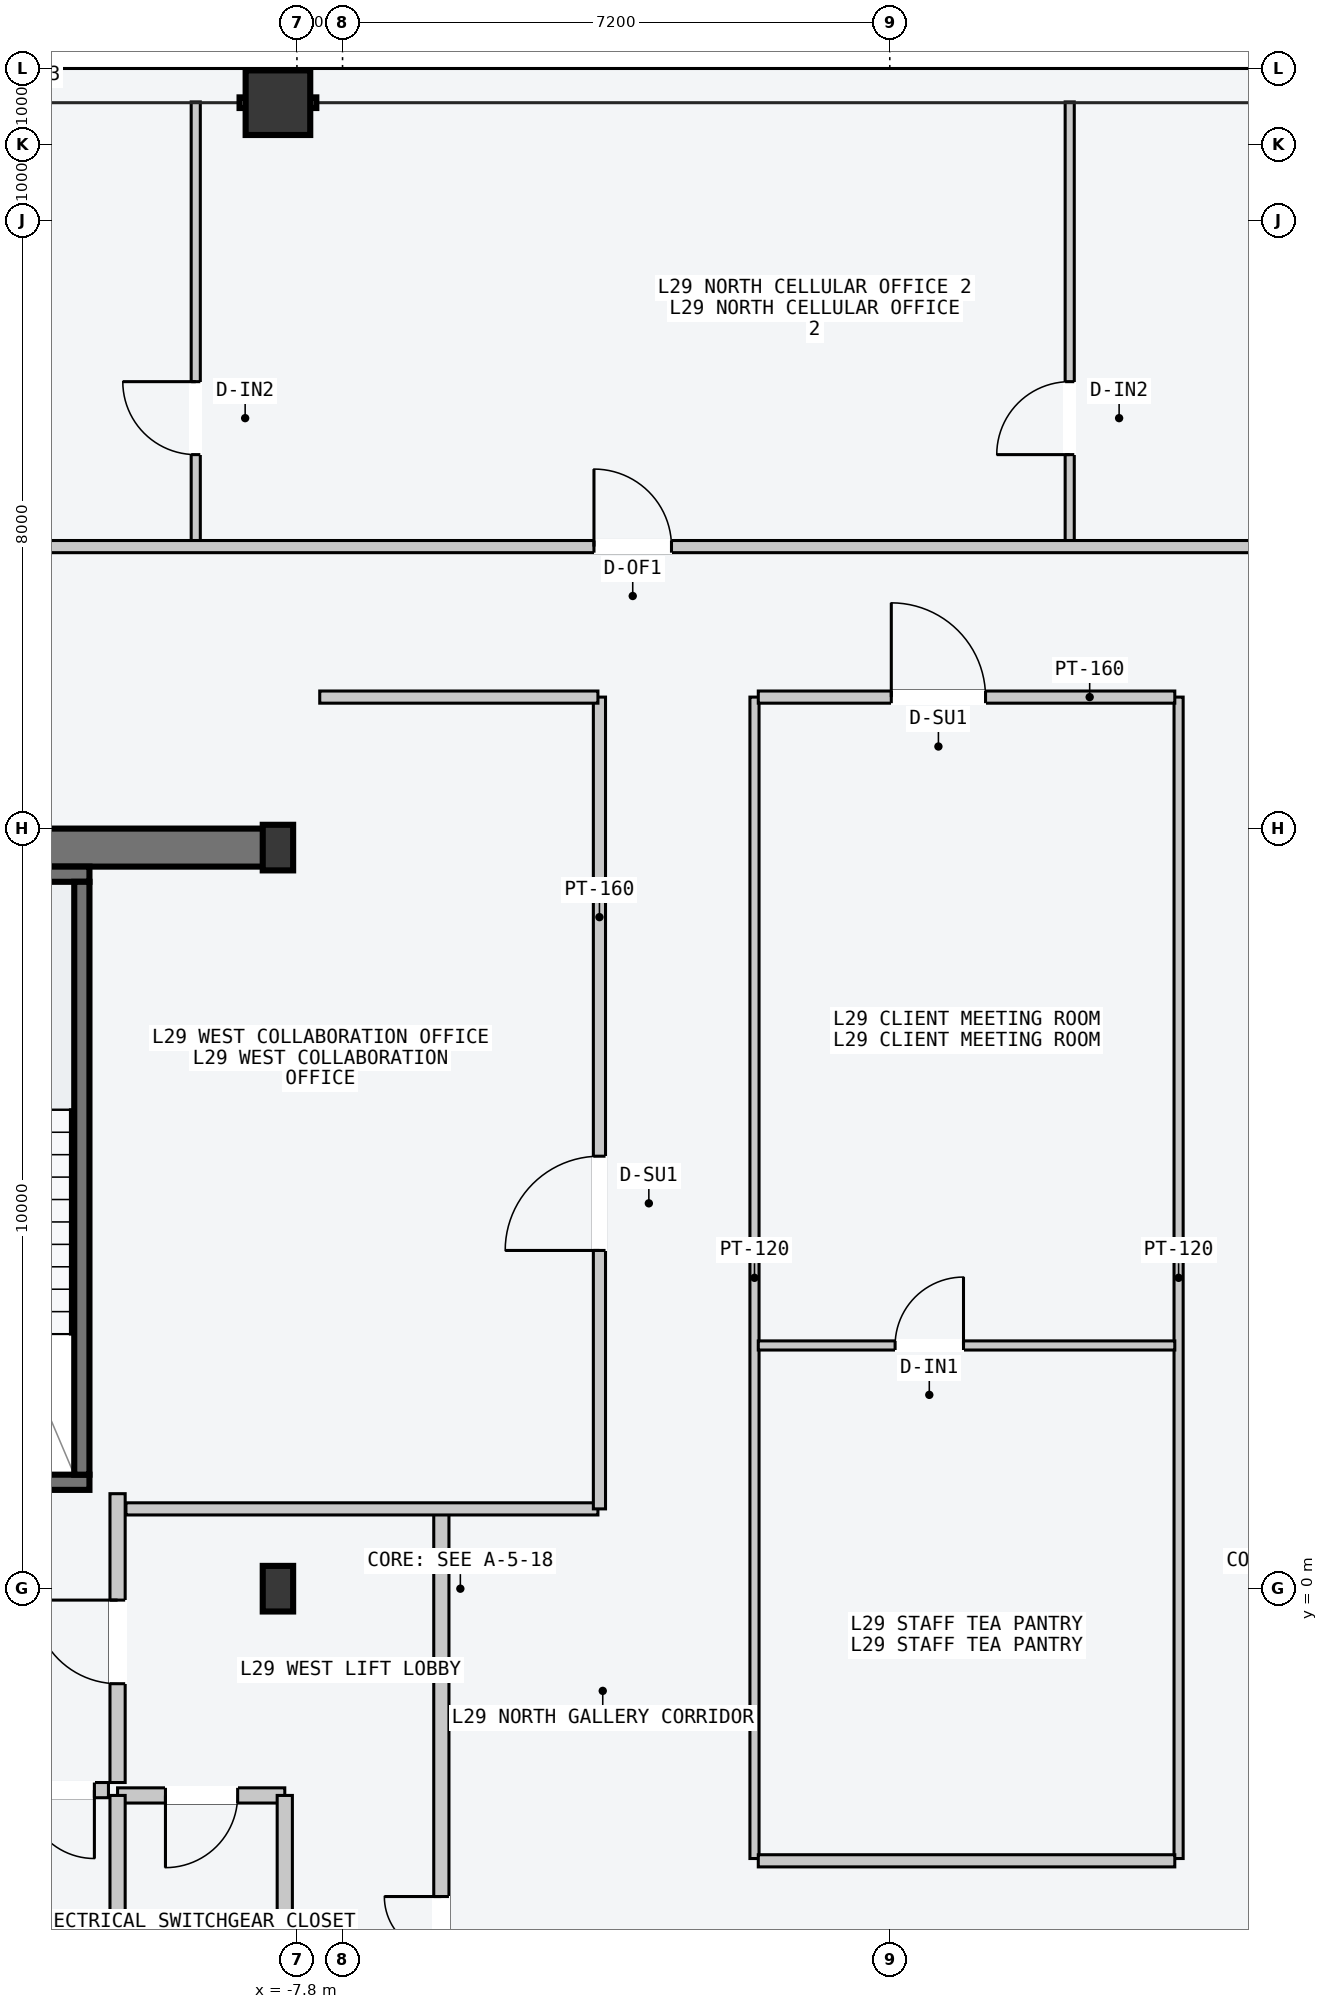
"""IFC4 building model, lengths in metres.
Left out: names, types, materials, properties, quantities, classifications, styles, units other than length and angle.
Written with IfcOpenShell. Run it as: python <this file> out.ifc"""

import sys

from ifc_helpers import new_model, si_unit, direction, frame, frame_2d, origin, origin_2d, place, context, subcontext, project, spatial, rectangle, hollow_rectangle, i_section, extrude, element, fill, save


model = new_model("IFC4")
c1 = context("Model", 3, precision=1e-05, world=origin(), true_north=direction((0.0, 1.0)))
c2 = subcontext(c1, "Body", "Model", "MODEL_VIEW")
j1 = project(units=[si_unit("LENGTHUNIT", "METRE"), si_unit("PLANEANGLEUNIT", "RADIAN")], contexts=[c1])
p1 = place(None, origin())
s1 = spatial("IfcSite", under=j1, at=p1, CompositionType="ELEMENT")
p2 = place(p1, origin())
s2 = spatial("IfcBuilding", under=s1, at=p2, CompositionType="ELEMENT")
p3 = place(p2, frame((0.0, 0.0, 113.4)))
s3 = spatial("IfcBuildingStorey", under=s2, at=p3, CompositionType="ELEMENT", Elevation=113.4)
p4 = place(p3, frame((-14.53, 9.75, -0.2), z_axis=(0.0, 0.0, 1.0), x_axis=(1.0, 0.0, 0.0)))
e1 = element("IfcWall", 1, at=p4, inside=s3, PredefinedType="SHEAR", context=c2, shape_type="SweptSolid", body=[
    extrude(rectangle(XDim=6.46, YDim=0.5, at=frame_2d((3.23, 0.0))), origin(), (0.0, 0.0, 1.0), 3.6),
])
p5 = place(p3, frame((-14.25, 1.4, -0.2), z_axis=(0.0, 0.0, 1.0), x_axis=(1.0, 0.0, 0.0)))
e2 = element("IfcWall", 2, at=p5, inside=s3, PredefinedType="SOLIDWALL", context=c2, shape_type="SweptSolid", body=[
    extrude(rectangle(XDim=3.72, YDim=0.2, at=frame_2d((1.86, 0.0))), origin(), (0.0, 0.0, 1.0), 3.6),
])
p6 = place(p5, frame((1.5, 0.0, 0.2)))
e3 = element("IfcOpeningElement", 3, at=p6, cuts=e2, PredefinedType="OPENING", context=c2, shape_type="SweptSolid", body=[
    extrude(rectangle(XDim=1.12, YDim=2.18, at=frame_2d((0.56, 1.09))), frame((0.0, 0.11, 0.0), z_axis=(0.0, -1.0, 0.0), x_axis=(1.0, 0.0, 0.0)), (0.0, 0.0, 1.0), 0.22),
])
p7 = place(p3, frame((-14.25, 9.4, -0.2), z_axis=(0.0, 0.0, 1.0), x_axis=(1.0, 0.0, 0.0)))
e4 = element("IfcWall", 4, at=p7, inside=s3, PredefinedType="SOLIDWALL", context=c2, shape_type="SweptSolid", body=[
    extrude(rectangle(XDim=3.72, YDim=0.2, at=frame_2d((1.86, 0.0))), origin(), (0.0, 0.0, 1.0), 3.6),
])
p8 = place(p3, frame((-10.63, 1.5, -0.2), z_axis=(0.0, 0.0, 1.0), x_axis=(0.0, 1.0, 0.0)))
e5 = element("IfcWall", 5, at=p8, inside=s3, PredefinedType="SOLIDWALL", context=c2, shape_type="SweptSolid", body=[
    extrude(rectangle(XDim=7.8, YDim=0.2, at=frame_2d((3.9, 0.0))), origin(), (0.0, 0.0, 1.0), 3.6),
])
for number, where, z_axis, x_axis in (
    (6, (-8.05, 0.0, 0.0), (0.0, 0.0, 1.0), (1.0, 0.0, 0.0)),
    (7, (-8.05, 9.75, 0.0), (0.0, 0.0, 1.0), (1.0, 0.0, 0.0)),
):
    element("IfcColumn", number, at=place(p3, frame(where, z_axis=z_axis, x_axis=x_axis)), inside=s3, PredefinedType="COLUMN", context=c2, shape_type="SweptSolid", body=[
        extrude(i_section(OverallWidth=0.4, OverallDepth=0.6, WebThickness=0.022, FlangeThickness=0.036, at=origin_2d()), origin(), (0.0, 0.0, 1.0), 3.6),
    ])
p9 = place(p3, frame((-8.05, 19.55, 0.0), z_axis=(0.0, 0.0, 1.0), x_axis=(1.0, 0.0, 0.0)))
e8 = element("IfcColumn", 8, at=p9, inside=s3, PredefinedType="COLUMN", context=c2, shape_type="SweptSolid", body=[
    extrude(hollow_rectangle(XDim=0.85, YDim=0.85, WallThickness=0.04, at=origin_2d()), origin(), (0.0, 0.0, 1.0), 3.6),
])
p10 = place(p3, frame((-5.9, -9.45, 0.0), z_axis=(0.0, 0.0, 1.0), x_axis=(0.0, 1.0, 0.0)))
e9 = element("IfcWall", 9, at=p10, inside=s3, PredefinedType="PARTITIONING", context=c2, shape_type="SweptSolid", body=[
    extrude(rectangle(XDim=10.5, YDim=0.2, at=frame_2d((5.25, 0.0))), origin(), (0.0, 0.0, 1.0), 3.4),
])
p11 = place(p10, frame((3.9, 0.0, 0.0)))
e10 = element("IfcOpeningElement", 10, at=p11, cuts=e9, PredefinedType="OPENING", context=c2, shape_type="SweptSolid", body=[
    extrude(rectangle(XDim=1.5, YDim=2.2, at=frame_2d((0.75, 1.1))), frame((0.0, 0.11, 0.0), z_axis=(0.0, -1.0, 0.0), x_axis=(1.0, 0.0, 0.0)), (0.0, 0.0, 1.0), 0.22),
])
p12 = place(p3, frame((-10.16, -2.55, 0.0), z_axis=(0.0, 0.0, 1.0), x_axis=(0.0, 1.0, 0.0)))
e11 = element("IfcWall", 11, at=p12, inside=s3, PredefinedType="PARTITIONING", context=c2, shape_type="SweptSolid", body=[
    extrude(rectangle(XDim=3.8, YDim=0.2, at=frame_2d((1.9, 0.0))), origin(), (0.0, 0.0, 1.0), 3.4),
])
p13 = place(p12, frame((1.3, 0.0, 0.0)))
e12 = element("IfcOpeningElement", 12, at=p13, cuts=e11, PredefinedType="OPENING", context=c2, shape_type="SweptSolid", body=[
    extrude(rectangle(XDim=1.1, YDim=2.15, at=frame_2d((0.55, 1.075))), frame((0.0, 0.11, 0.0), z_axis=(0.0, -1.0, 0.0), x_axis=(1.0, 0.0, 0.0)), (0.0, 0.0, 1.0), 0.22),
])
p14 = place(p3, frame((-10.28, -2.65, 0.0), z_axis=(0.0, 0.0, 1.0), x_axis=(-1.0, 0.0, 0.0)))
e13 = element("IfcWall", 13, at=p14, inside=s3, PredefinedType="PARTITIONING", context=c2, shape_type="SweptSolid", body=[
    extrude(rectangle(XDim=1.27, YDim=0.2, at=frame_2d((0.635, 0.0))), origin(), (0.0, 0.0, 1.0), 3.4),
])
p15 = place(p14, frame((0.185, 0.0, 0.0)))
e14 = element("IfcOpeningElement", 14, at=p15, cuts=e13, PredefinedType="OPENING", context=c2, shape_type="SweptSolid", body=[
    extrude(rectangle(XDim=0.9, YDim=2.15, at=frame_2d((0.45, 1.075))), frame((0.0, 0.11, 0.0), z_axis=(0.0, -1.0, 0.0), x_axis=(1.0, 0.0, 0.0)), (0.0, 0.0, 1.0), 0.22),
])
p16 = place(p3, frame((-7.96, -2.72, 0.0), z_axis=(0.0, 0.0, 1.0), x_axis=(-1.0, 0.0, 0.0)))
e15 = element("IfcWall", 15, at=p16, inside=s3, PredefinedType="PARTITIONING", context=c2, shape_type="SweptSolid", body=[
    extrude(rectangle(XDim=2.2, YDim=0.2, at=frame_2d((1.1, 0.0))), origin(), (0.0, 0.0, 1.0), 3.4),
])
p17 = place(p16, frame((0.62, 0.0, 0.0)))
e16 = element("IfcOpeningElement", 16, at=p17, cuts=e15, PredefinedType="OPENING", context=c2, shape_type="SweptSolid", body=[
    extrude(rectangle(XDim=0.95, YDim=2.1, at=frame_2d((0.475, 1.05))), frame((0.0, 0.11, 0.0), z_axis=(0.0, -1.0, 0.0), x_axis=(1.0, 0.0, 0.0)), (0.0, 0.0, 1.0), 0.22),
])
for number, where, z_axis, x_axis in (
    (17, (-7.96, -5.16, 0.0), (0.0, 0.0, 1.0), (0.0, 1.0, 0.0)),
    (18, (-10.16, -5.16, 0.0), (0.0, 0.0, 1.0), (0.0, 1.0, 0.0)),
):
    element("IfcWall", number, at=place(p3, frame(where, z_axis=z_axis, x_axis=x_axis)), inside=s3, PredefinedType="PARTITIONING", context=c2, shape_type="SweptSolid", body=[
        extrude(rectangle(XDim=2.44, YDim=0.2, at=frame_2d((1.22, 0.0))), origin(), (0.0, 0.0, 1.0), 3.4),
    ])
p18 = place(p3, frame((-10.05, 1.05, 0.0), z_axis=(0.0, 0.0, 1.0), x_axis=(1.0, 0.0, 0.0)))
e19 = element("IfcWall", 19, at=p18, inside=s3, PredefinedType="PARTITIONING", context=c2, shape_type="SweptSolid", body=[
    extrude(rectangle(XDim=6.21, YDim=0.16, at=frame_2d((3.105, 0.0))), origin(), (0.0, 0.0, 1.0), 3.4),
])
p19 = place(p3, frame((-3.82, 1.05, 0.0), z_axis=(0.0, 0.0, 1.0), x_axis=(0.0, 1.0, 0.0)))
e20 = element("IfcWall", 20, at=p19, inside=s3, PredefinedType="PARTITIONING", context=c2, shape_type="SweptSolid", body=[
    extrude(rectangle(XDim=10.68, YDim=0.16, at=frame_2d((5.34, 0.0))), origin(), (0.0, 0.0, 1.0), 3.4),
])
p20 = place(p19, frame((3.4, 0.0, 0.0)))
e21 = element("IfcOpeningElement", 21, at=p20, cuts=e20, PredefinedType="OPENING", context=c2, shape_type="SweptSolid", body=[
    extrude(rectangle(XDim=1.24, YDim=2.24, at=frame_2d((0.62, 1.12))), frame((0.0, 0.09, 0.0), z_axis=(0.0, -1.0, 0.0), x_axis=(1.0, 0.0, 0.0)), (0.0, 0.0, 1.0), 0.18),
])
p21 = place(p3, frame((-7.5, 11.73, 0.0), z_axis=(0.0, 0.0, 1.0), x_axis=(1.0, 0.0, 0.0)))
e22 = element("IfcWall", 22, at=p21, inside=s3, PredefinedType="PARTITIONING", context=c2, shape_type="SweptSolid", body=[
    extrude(rectangle(XDim=3.66, YDim=0.16, at=frame_2d((1.83, 0.0))), origin(), (0.0, 0.0, 1.0), 3.4),
])
for number, where, z_axis, x_axis in (
    (23, (-1.78, -3.55, 0.0), (0.0, 0.0, 1.0), (0.0, 1.0, 0.0)),
    (24, (3.8, -3.55, 0.0), (0.0, 0.0, 1.0), (0.0, 1.0, 0.0)),
):
    element("IfcWall", number, at=place(p3, frame(where, z_axis=z_axis, x_axis=x_axis)), inside=s3, PredefinedType="PARTITIONING", context=c2, shape_type="SweptSolid", body=[
        extrude(rectangle(XDim=15.28, YDim=0.12, at=frame_2d((7.64, 0.0))), origin(), (0.0, 0.0, 1.0), 3.4),
    ])
p22 = place(p3, frame((-1.73, -3.58, 0.0), z_axis=(0.0, 0.0, 1.0), x_axis=(1.0, 0.0, 0.0)))
e25 = element("IfcWall", 25, at=p22, inside=s3, PredefinedType="PARTITIONING", context=c2, shape_type="SweptSolid", body=[
    extrude(rectangle(XDim=5.48, YDim=0.16, at=frame_2d((2.74, 0.0))), origin(), (0.0, 0.0, 1.0), 3.4),
])
p23 = place(p3, frame((-1.73, 3.2, 0.0), z_axis=(0.0, 0.0, 1.0), x_axis=(1.0, 0.0, 0.0)))
e26 = element("IfcWall", 26, at=p23, inside=s3, PredefinedType="PARTITIONING", context=c2, shape_type="SweptSolid", body=[
    extrude(rectangle(XDim=5.48, YDim=0.12, at=frame_2d((2.74, 0.0))), origin(), (0.0, 0.0, 1.0), 3.4),
])
p24 = place(p23, frame((1.8, 0.0, 0.0)))
e27 = element("IfcOpeningElement", 27, at=p24, cuts=e26, PredefinedType="OPENING", context=c2, shape_type="SweptSolid", body=[
    extrude(rectangle(XDim=0.9, YDim=2.15, at=frame_2d((0.45, 1.075))), frame((0.0, 0.07, 0.0), z_axis=(0.0, -1.0, 0.0), x_axis=(1.0, 0.0, 0.0)), (0.0, 0.0, 1.0), 0.14),
])
p25 = place(p3, frame((-1.73, 11.73, 0.0), z_axis=(0.0, 0.0, 1.0), x_axis=(1.0, 0.0, 0.0)))
e28 = element("IfcWall", 28, at=p25, inside=s3, PredefinedType="PARTITIONING", context=c2, shape_type="SweptSolid", body=[
    extrude(rectangle(XDim=5.48, YDim=0.16, at=frame_2d((2.74, 0.0))), origin(), (0.0, 0.0, 1.0), 3.4),
])
p26 = place(p25, frame((1.75, 0.0, 0.0)))
e29 = element("IfcOpeningElement", 29, at=p26, cuts=e28, PredefinedType="OPENING", context=c2, shape_type="SweptSolid", body=[
    extrude(rectangle(XDim=1.24, YDim=2.24, at=frame_2d((0.62, 1.12))), frame((0.0, 0.09, 0.0), z_axis=(0.0, -1.0, 0.0), x_axis=(1.0, 0.0, 0.0)), (0.0, 0.0, 1.0), 0.18),
])
p27 = place(p3, frame((-9.131, 13.77, 0.0), z_axis=(0.0, 0.0, 1.0), x_axis=(0.0, 1.0, 0.0)))
e30 = element("IfcWall", 30, at=p27, inside=s3, PredefinedType="PARTITIONING", context=c2, shape_type="SweptSolid", body=[
    extrude(rectangle(XDim=5.79, YDim=0.12, at=frame_2d((2.895, 0.0))), origin(), (0.0, 0.0, 1.0), 3.4),
])
p28 = place(p27, frame((1.15, 0.0, 0.0)))
e31 = element("IfcOpeningElement", 31, at=p28, cuts=e30, PredefinedType="OPENING", context=c2, shape_type="SweptSolid", body=[
    extrude(rectangle(XDim=0.96, YDim=2.18, at=frame_2d((0.48, 1.09))), frame((0.0, 0.07, 0.0), z_axis=(0.0, -1.0, 0.0), x_axis=(1.0, 0.0, 0.0)), (0.0, 0.0, 1.0), 0.14),
])
p29 = place(p3, frame((2.367, 13.77, 0.0), z_axis=(0.0, 0.0, 1.0), x_axis=(0.0, 1.0, 0.0)))
e32 = element("IfcWall", 32, at=p29, inside=s3, PredefinedType="PARTITIONING", context=c2, shape_type="SweptSolid", body=[
    extrude(rectangle(XDim=5.79, YDim=0.12, at=frame_2d((2.895, 0.0))), origin(), (0.0, 0.0, 1.0), 3.4),
])
p30 = place(p29, frame((1.15, 0.0, 0.0)))
e33 = element("IfcOpeningElement", 33, at=p30, cuts=e32, PredefinedType="OPENING", context=c2, shape_type="SweptSolid", body=[
    extrude(rectangle(XDim=0.96, YDim=2.18, at=frame_2d((0.48, 1.09))), frame((0.0, 0.07, 0.0), z_axis=(0.0, -1.0, 0.0), x_axis=(1.0, 0.0, 0.0)), (0.0, 0.0, 1.0), 0.14),
])
p31 = place(p3, frame((-16.1, 13.71, 0.0), z_axis=(0.0, 0.0, 1.0), x_axis=(1.0, 0.0, 0.0)))
e34 = element("IfcWall", 34, at=p31, inside=s3, PredefinedType="PARTITIONING", context=c2, shape_type="SweptSolid", body=[
    extrude(rectangle(XDim=32.2, YDim=0.16, at=frame_2d((16.1, 0.0))), origin(), (0.0, 0.0, 1.0), 3.4),
])
p32 = place(p31, frame((3.004, 0.0, 0.0)))
e35 = element("IfcOpeningElement", 35, at=p32, cuts=e34, PredefinedType="OPENING", context=c2, shape_type="SweptSolid", body=[
    extrude(rectangle(XDim=0.96, YDim=2.18, at=frame_2d((0.48, 1.09))), frame((0.0, 0.09, 0.0), z_axis=(0.0, -1.0, 0.0), x_axis=(1.0, 0.0, 0.0)), (0.0, 0.0, 1.0), 0.18),
])
p33 = place(p31, frame((12.208, 0.0, 0.0)))
e36 = element("IfcOpeningElement", 36, at=p33, cuts=e34, PredefinedType="OPENING", context=c2, shape_type="SweptSolid", body=[
    extrude(rectangle(XDim=1.02, YDim=2.2, at=frame_2d((0.51, 1.1))), frame((0.0, 0.09, 0.0), z_axis=(0.0, -1.0, 0.0), x_axis=(1.0, 0.0, 0.0)), (0.0, 0.0, 1.0), 0.18),
])
p34 = place(p31, frame((24.804, 0.0, 0.0)))
e37 = element("IfcOpeningElement", 37, at=p34, cuts=e34, PredefinedType="OPENING", context=c2, shape_type="SweptSolid", body=[
    extrude(rectangle(XDim=1.06, YDim=2.2, at=frame_2d((0.53, 1.1))), frame((0.0, 0.09, 0.0), z_axis=(0.0, -1.0, 0.0), x_axis=(1.0, 0.0, 0.0)), (0.0, 0.0, 1.0), 0.18),
])
p35 = place(p11, origin())
e38 = element("IfcDoor", 38, at=p35, inside=s3, OperationType="DOUBLE_DOOR_SINGLE_SWING", PredefinedType="DOOR", context=c2, shape_type="SweptSolid", body=[
    extrude(rectangle(XDim=1.5, YDim=2.2, at=frame_2d((0.75, 1.1))), frame((0.0, 0.025, 0.0), z_axis=(0.0, -1.0, 0.0), x_axis=(1.0, 0.0, 0.0)), (0.0, 0.0, 1.0), 0.05),
])
fill(e10, e38)
p36 = place(p13, origin())
e39 = element("IfcDoor", 39, at=p36, inside=s3, OperationType="SINGLE_SWING_RIGHT", PredefinedType="DOOR", context=c2, shape_type="SweptSolid", body=[
    extrude(rectangle(XDim=1.1, YDim=2.15, at=frame_2d((0.55, 1.075))), frame((0.0, 0.025, 0.0), z_axis=(0.0, -1.0, 0.0), x_axis=(1.0, 0.0, 0.0)), (0.0, 0.0, 1.0), 0.05),
])
fill(e12, e39)
p37 = place(p15, origin())
e40 = element("IfcDoor", 40, at=p37, inside=s3, OperationType="SINGLE_SWING_LEFT", PredefinedType="DOOR", context=c2, shape_type="SweptSolid", body=[
    extrude(rectangle(XDim=0.9, YDim=2.15, at=frame_2d((0.45, 1.075))), frame((0.0, 0.025, 0.0), z_axis=(0.0, -1.0, 0.0), x_axis=(1.0, 0.0, 0.0)), (0.0, 0.0, 1.0), 0.05),
])
fill(e14, e40)
p38 = place(p17, origin())
e41 = element("IfcDoor", 41, at=p38, inside=s3, OperationType="SINGLE_SWING_RIGHT", PredefinedType="DOOR", context=c2, shape_type="SweptSolid", body=[
    extrude(rectangle(XDim=0.95, YDim=2.1, at=frame_2d((0.475, 1.05))), frame((0.0, 0.025, 0.0), z_axis=(0.0, -1.0, 0.0), x_axis=(1.0, 0.0, 0.0)), (0.0, 0.0, 1.0), 0.05),
])
fill(e16, e41)
p39 = place(p20, origin())
e42 = element("IfcDoor", 42, at=p39, inside=s3, OperationType="SINGLE_SWING_LEFT", PredefinedType="DOOR", context=c2, shape_type="SweptSolid", body=[
    extrude(rectangle(XDim=1.24, YDim=2.24, at=frame_2d((0.62, 1.12))), frame((0.0, 0.025, 0.0), z_axis=(0.0, -1.0, 0.0), x_axis=(1.0, 0.0, 0.0)), (0.0, 0.0, 1.0), 0.05),
])
fill(e21, e42)
p40 = place(p24, origin())
e43 = element("IfcDoor", 43, at=p40, inside=s3, OperationType="SINGLE_SWING_RIGHT", PredefinedType="DOOR", context=c2, shape_type="SweptSolid", body=[
    extrude(rectangle(XDim=0.9, YDim=2.15, at=frame_2d((0.45, 1.075))), frame((0.0, 0.025, 0.0), z_axis=(0.0, -1.0, 0.0), x_axis=(1.0, 0.0, 0.0)), (0.0, 0.0, 1.0), 0.05),
])
fill(e27, e43)
p41 = place(p26, origin())
e44 = element("IfcDoor", 44, at=p41, inside=s3, OperationType="SINGLE_SWING_LEFT", PredefinedType="DOOR", context=c2, shape_type="SweptSolid", body=[
    extrude(rectangle(XDim=1.24, YDim=2.24, at=frame_2d((0.62, 1.12))), frame((0.0, 0.025, 0.0), z_axis=(0.0, -1.0, 0.0), x_axis=(1.0, 0.0, 0.0)), (0.0, 0.0, 1.0), 0.05),
])
fill(e29, e44)
p42 = place(p28, origin())
e45 = element("IfcDoor", 45, at=p42, inside=s3, OperationType="SINGLE_SWING_RIGHT", PredefinedType="DOOR", context=c2, shape_type="SweptSolid", body=[
    extrude(rectangle(XDim=0.96, YDim=2.18, at=frame_2d((0.48, 1.09))), frame((0.0, 0.025, 0.0), z_axis=(0.0, -1.0, 0.0), x_axis=(1.0, 0.0, 0.0)), (0.0, 0.0, 1.0), 0.05),
])
fill(e31, e45)
p43 = place(p30, origin())
e46 = element("IfcDoor", 46, at=p43, inside=s3, OperationType="SINGLE_SWING_LEFT", PredefinedType="DOOR", context=c2, shape_type="SweptSolid", body=[
    extrude(rectangle(XDim=0.96, YDim=2.18, at=frame_2d((0.48, 1.09))), frame((0.0, 0.025, 0.0), z_axis=(0.0, -1.0, 0.0), x_axis=(1.0, 0.0, 0.0)), (0.0, 0.0, 1.0), 0.05),
])
fill(e33, e46)
p44 = place(p33, origin())
e47 = element("IfcDoor", 47, at=p44, inside=s3, OperationType="SINGLE_SWING_LEFT", PredefinedType="DOOR", context=c2, shape_type="SweptSolid", body=[
    extrude(rectangle(XDim=1.02, YDim=2.2, at=frame_2d((0.51, 1.1))), frame((0.0, 0.025, 0.0), z_axis=(0.0, -1.0, 0.0), x_axis=(1.0, 0.0, 0.0)), (0.0, 0.0, 1.0), 0.05),
])
fill(e36, e47)
save(model, sys.argv[1])
